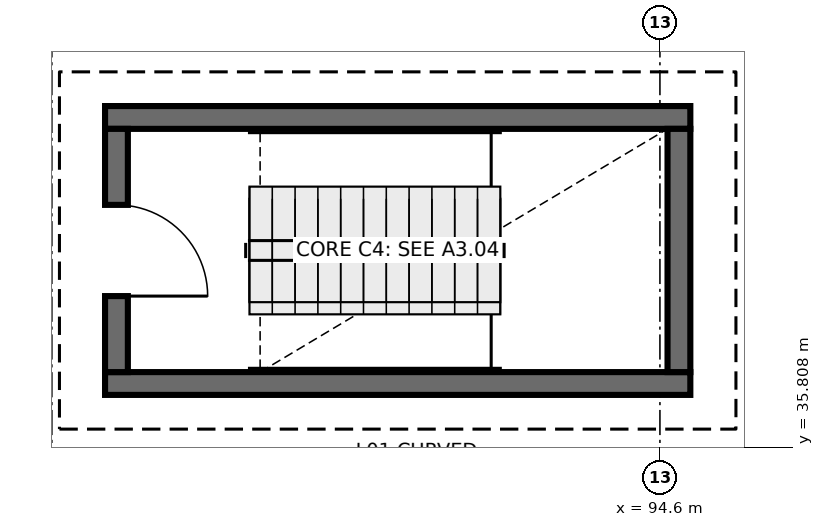
"""IFC4 building model, lengths in metres.
Left out: names, types, materials, properties, quantities, classifications, styles, units other than length and angle.
Written with IfcOpenShell. Run it as: python <this file> out.ifc"""

import sys

from ifc_helpers import new_model, si_unit, direction, frame, frame_2d, origin, place, context, subcontext, project, spatial, rectangle, extrude, element, fill, save


model = new_model("IFC4")
c1 = context("Model", 3, precision=1e-05, world=origin(), true_north=direction((0.0, 1.0)))
c2 = subcontext(c1, "Body", "Model", "MODEL_VIEW")
j1 = project(units=[si_unit("LENGTHUNIT", "METRE"), si_unit("PLANEANGLEUNIT", "RADIAN")], contexts=[c1])
p1 = place(None, origin())
s1 = spatial("IfcSite", under=j1, at=p1, CompositionType="ELEMENT")
p2 = place(p1, origin())
s2 = spatial("IfcBuilding", under=s1, at=p2, CompositionType="ELEMENT")
p3 = place(p2, frame((0.0, 0.0, 4.8)))
s3 = spatial("IfcBuildingStorey", under=s2, at=p3, CompositionType="ELEMENT", Elevation=4.8)
for number, where, z_axis, x_axis in (
    (1, (87.3, 36.65, 0.0), (0.0, 0.0, 1.0), (1.0, 0.0, 0.0)),
    (2, (95.0, 40.15, 0.0), (0.0, 0.0, 1.0), (-1.0, 0.0, 0.0)),
):
    element("IfcWall", number, at=place(p3, frame(where, z_axis=z_axis, x_axis=x_axis)), inside=s3, PredefinedType="SHEAR", context=c2, shape_type="SweptSolid", body=[
        extrude(rectangle(XDim=7.7, YDim=0.3, at=frame_2d((3.85, 0.0))), origin(), (0.0, 0.0, 1.0), 4.5),
    ])
p4 = place(p3, frame((87.45, 40.0, 0.0), z_axis=(0.0, 0.0, 1.0), x_axis=(0.0, -1.0, 0.0)))
e3 = element("IfcWall", 3, at=p4, inside=s3, PredefinedType="SHEAR", context=c2, shape_type="SweptSolid", body=[
    extrude(rectangle(XDim=3.2, YDim=0.3, at=frame_2d((1.6, 0.0))), origin(), (0.0, 0.0, 1.0), 4.5),
])
p5 = place(p4, frame((1.0, 0.0, 0.0)))
e4 = element("IfcOpeningElement", 4, at=p5, cuts=e3, PredefinedType="OPENING", context=c2, shape_type="SweptSolid", body=[
    extrude(rectangle(XDim=1.2, YDim=2.15, at=frame_2d((0.6, 1.075))), frame((0.0, 0.16, 0.0), z_axis=(0.0, -1.0, 0.0), x_axis=(1.0, 0.0, 0.0)), (0.0, 0.0, 1.0), 0.32),
])
p6 = place(p3, frame((94.85, 36.8, 0.0), z_axis=(0.0, 0.0, 1.0), x_axis=(0.0, 1.0, 0.0)))
e5 = element("IfcWall", 5, at=p6, inside=s3, PredefinedType="SHEAR", context=c2, shape_type="SweptSolid", body=[
    extrude(rectangle(XDim=3.2, YDim=0.3, at=frame_2d((1.6, 0.0))), origin(), (0.0, 0.0, 1.0), 4.5),
])
p7 = place(p5, origin())
e6 = element("IfcDoor", 6, at=p7, inside=s3, OperationType="SINGLE_SWING_RIGHT", PredefinedType="DOOR", context=c2, shape_type="SweptSolid", body=[
    extrude(rectangle(XDim=1.2, YDim=2.15, at=frame_2d((0.6, 1.075))), frame((0.0, 0.025, 0.0), z_axis=(0.0, -1.0, 0.0), x_axis=(1.0, 0.0, 0.0)), (0.0, 0.0, 1.0), 0.05),
])
fill(e4, e6)
save(model, sys.argv[1])
